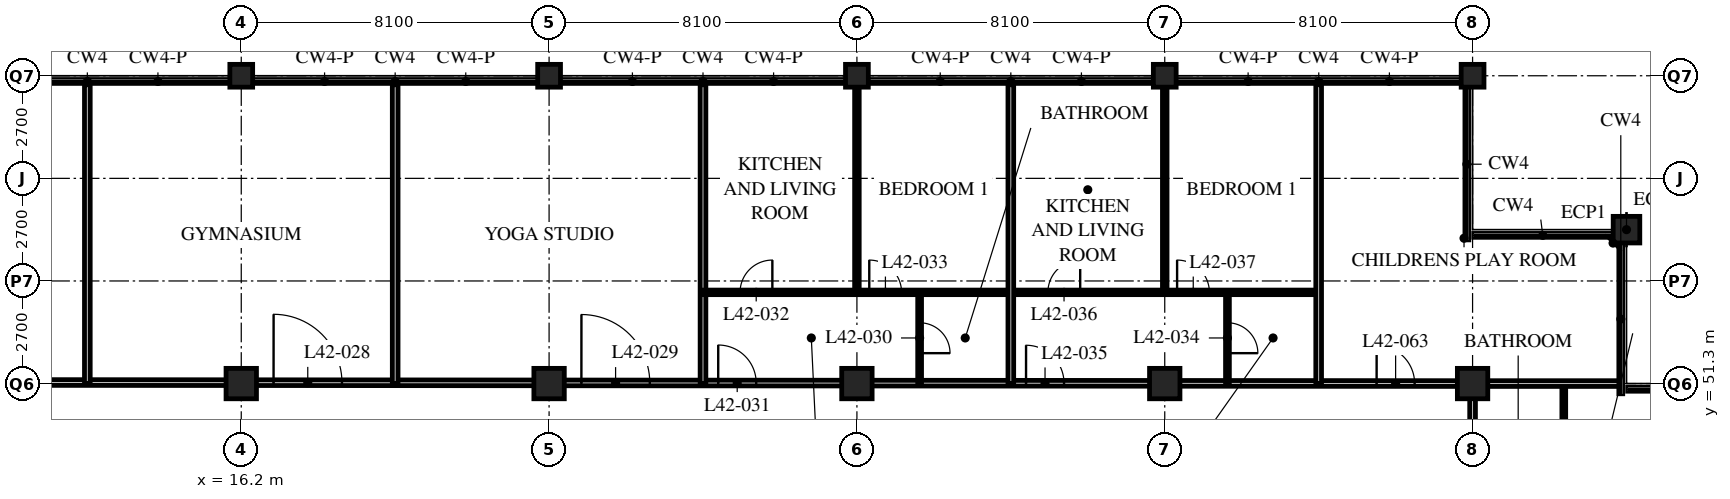
"""IFC4 building model, lengths in metres.
Left out: names, types, materials, properties, quantities, classifications, styles, units other than length and angle.
Written with IfcOpenShell. Run it as: python <this file> out.ifc"""

import sys

from ifc_helpers import new_model, si_unit, direction, frame, frame_2d, origin, origin_2d, place, context, subcontext, project, spatial, rectangle, hollow_rectangle, extrude, element, fill, save


model = new_model("IFC4")
c1 = context("Model", 3, precision=1e-05, world=origin(), true_north=direction((0.0, 1.0)))
c2 = subcontext(c1, "Body", "Model", "MODEL_VIEW")
j1 = project(units=[si_unit("LENGTHUNIT", "METRE"), si_unit("PLANEANGLEUNIT", "RADIAN")], contexts=[c1])
p1 = place(None, origin())
s1 = spatial("IfcSite", under=j1, at=p1, CompositionType="ELEMENT")
p2 = place(p1, origin())
s2 = spatial("IfcBuilding", under=s1, at=p2, CompositionType="ELEMENT")
p3 = place(p2, frame((0.0, 0.0, 165.0)))
s3 = spatial("IfcBuildingStorey", under=s2, at=p3, CompositionType="ELEMENT", Elevation=165.0)
p4 = place(p3, frame((16.2, 51.3, 0.0), z_axis=(0.0, 0.0, 1.0), x_axis=(1.0, 0.0, 0.0)))
e1 = element("IfcColumn", 1, at=p4, inside=s3, PredefinedType="COLUMN", context=c2, shape_type="SweptSolid", body=[
    extrude(hollow_rectangle(XDim=0.8, YDim=0.8, WallThickness=0.08, at=origin_2d()), origin(), (0.0, 0.0, 1.0), 5.4),
])
p5 = place(p3, frame((16.2, 59.4, 0.0), z_axis=(0.0, 0.0, 1.0), x_axis=(1.0, 0.0, 0.0)))
e2 = element("IfcColumn", 2, at=p5, inside=s3, PredefinedType="COLUMN", context=c2, shape_type="SweptSolid", body=[
    extrude(hollow_rectangle(XDim=0.6, YDim=0.6, WallThickness=0.05, at=origin_2d()), origin(), (0.0, 0.0, 1.0), 5.4),
])
p6 = place(p3, frame((24.3, 51.3, 0.0), z_axis=(0.0, 0.0, 1.0), x_axis=(1.0, 0.0, 0.0)))
e3 = element("IfcColumn", 3, at=p6, inside=s3, PredefinedType="COLUMN", context=c2, shape_type="SweptSolid", body=[
    extrude(hollow_rectangle(XDim=0.8, YDim=0.8, WallThickness=0.08, at=origin_2d()), origin(), (0.0, 0.0, 1.0), 5.4),
])
p7 = place(p3, frame((24.3, 59.4, 0.0), z_axis=(0.0, 0.0, 1.0), x_axis=(1.0, 0.0, 0.0)))
e4 = element("IfcColumn", 4, at=p7, inside=s3, PredefinedType="COLUMN", context=c2, shape_type="SweptSolid", body=[
    extrude(hollow_rectangle(XDim=0.6, YDim=0.6, WallThickness=0.05, at=origin_2d()), origin(), (0.0, 0.0, 1.0), 5.4),
])
p8 = place(p3, frame((32.4, 51.3, 0.0), z_axis=(0.0, 0.0, 1.0), x_axis=(1.0, 0.0, 0.0)))
e5 = element("IfcColumn", 5, at=p8, inside=s3, PredefinedType="COLUMN", context=c2, shape_type="SweptSolid", body=[
    extrude(hollow_rectangle(XDim=0.8, YDim=0.8, WallThickness=0.08, at=origin_2d()), origin(), (0.0, 0.0, 1.0), 5.4),
])
p9 = place(p3, frame((32.4, 59.4, 0.0), z_axis=(0.0, 0.0, 1.0), x_axis=(1.0, 0.0, 0.0)))
e6 = element("IfcColumn", 6, at=p9, inside=s3, PredefinedType="COLUMN", context=c2, shape_type="SweptSolid", body=[
    extrude(hollow_rectangle(XDim=0.6, YDim=0.6, WallThickness=0.05, at=origin_2d()), origin(), (0.0, 0.0, 1.0), 5.4),
])
p10 = place(p3, frame((40.5, 51.3, 0.0), z_axis=(0.0, 0.0, 1.0), x_axis=(1.0, 0.0, 0.0)))
e7 = element("IfcColumn", 7, at=p10, inside=s3, PredefinedType="COLUMN", context=c2, shape_type="SweptSolid", body=[
    extrude(hollow_rectangle(XDim=0.8, YDim=0.8, WallThickness=0.08, at=origin_2d()), origin(), (0.0, 0.0, 1.0), 5.4),
])
p11 = place(p3, frame((40.5, 59.4, 0.0), z_axis=(0.0, 0.0, 1.0), x_axis=(1.0, 0.0, 0.0)))
e8 = element("IfcColumn", 8, at=p11, inside=s3, PredefinedType="COLUMN", context=c2, shape_type="SweptSolid", body=[
    extrude(hollow_rectangle(XDim=0.6, YDim=0.6, WallThickness=0.05, at=origin_2d()), origin(), (0.0, 0.0, 1.0), 5.4),
])
p12 = place(p3, frame((48.6, 51.3, 0.0), z_axis=(0.0, 0.0, 1.0), x_axis=(1.0, 0.0, 0.0)))
e9 = element("IfcColumn", 9, at=p12, inside=s3, PredefinedType="COLUMN", context=c2, shape_type="SweptSolid", body=[
    extrude(hollow_rectangle(XDim=0.8, YDim=0.8, WallThickness=0.08, at=origin_2d()), origin(), (0.0, 0.0, 1.0), 5.4),
])
p13 = place(p3, frame((48.6, 59.4, 0.0), z_axis=(0.0, 0.0, 1.0), x_axis=(1.0, 0.0, 0.0)))
e10 = element("IfcColumn", 10, at=p13, inside=s3, PredefinedType="COLUMN", context=c2, shape_type="SweptSolid", body=[
    extrude(hollow_rectangle(XDim=0.6, YDim=0.6, WallThickness=0.05, at=origin_2d()), origin(), (0.0, 0.0, 1.0), 5.4),
])
p14 = place(p3, frame((52.65, 55.35, 0.0), z_axis=(0.0, 0.0, 1.0), x_axis=(1.0, 0.0, 0.0)))
e11 = element("IfcColumn", 11, at=p14, inside=s3, PredefinedType="COLUMN", context=c2, shape_type="SweptSolid", body=[
    extrude(hollow_rectangle(XDim=0.7, YDim=0.7, WallThickness=0.07, at=origin_2d()), origin(), (0.0, 0.0, 1.0), 5.4),
])
p15 = place(p3, frame((8.1, 51.33, 0.0), z_axis=(0.0, 0.0, 1.0), x_axis=(0.999999725116, -0.000741463917, 0.0)))
e12 = element("IfcWall", 12, at=p15, inside=s3, PredefinedType="PARTITIONING", context=c2, shape_type="SweptSolid", body=[
    extrude(rectangle(XDim=40.5, YDim=0.15, at=frame_2d((20.25, 0.0))), origin(), (0.0, 0.0, 1.0), 4.42),
])
p16 = place(p15, frame((8.95, 0.0, 0.0)))
e13 = element("IfcOpeningElement", 13, at=p16, cuts=e12, PredefinedType="OPENING", context=c2, shape_type="SweptSolid", body=[
    extrude(rectangle(XDim=1.8, YDim=2.4, at=frame_2d((0.9, 1.2))), frame((0.0, 0.085, 0.0), z_axis=(0.0, -1.0, 0.0), x_axis=(1.0, 0.0, 0.0)), (0.0, 0.0, 1.0), 0.17),
])
p17 = place(p15, frame((17.05, 0.0, 0.0)))
e14 = element("IfcOpeningElement", 14, at=p17, cuts=e12, PredefinedType="OPENING", context=c2, shape_type="SweptSolid", body=[
    extrude(rectangle(XDim=1.8, YDim=2.4, at=frame_2d((0.9, 1.2))), frame((0.0, 0.085, 0.0), z_axis=(0.0, -1.0, 0.0), x_axis=(1.0, 0.0, 0.0)), (0.0, 0.0, 1.0), 0.17),
])
p18 = place(p15, frame((20.65, 0.0, 0.0)))
e15 = element("IfcOpeningElement", 15, at=p18, cuts=e12, PredefinedType="OPENING", context=c2, shape_type="SweptSolid", body=[
    extrude(rectangle(XDim=1.0, YDim=2.1, at=frame_2d((0.5, 1.05))), frame((0.0, 0.085, 0.0), z_axis=(0.0, -1.0, 0.0), x_axis=(1.0, 0.0, 0.0)), (0.0, 0.0, 1.0), 0.17),
])
p19 = place(p15, frame((28.75, 0.0, 0.0)))
e16 = element("IfcOpeningElement", 16, at=p19, cuts=e12, PredefinedType="OPENING", context=c2, shape_type="SweptSolid", body=[
    extrude(rectangle(XDim=1.0, YDim=2.1, at=frame_2d((0.5, 1.05))), frame((0.0, 0.085, 0.0), z_axis=(0.0, -1.0, 0.0), x_axis=(1.0, 0.0, 0.0)), (0.0, 0.0, 1.0), 0.17),
])
p20 = place(p15, frame((37.975, 0.0, 0.0)))
e17 = element("IfcOpeningElement", 17, at=p20, cuts=e12, PredefinedType="OPENING", context=c2, shape_type="SweptSolid", body=[
    extrude(rectangle(XDim=1.0, YDim=2.1, at=frame_2d((0.5, 1.05))), frame((0.0, 0.085, 0.0), z_axis=(0.0, -1.0, 0.0), x_axis=(1.0, 0.0, 0.0)), (0.0, 0.0, 1.0), 0.17),
])
p21 = place(p15, frame((1.525, 0.0, 0.0)))
e18 = element("IfcOpeningElement", 18, at=p21, cuts=e12, PredefinedType="OPENING", context=c2, shape_type="SweptSolid", body=[
    extrude(rectangle(XDim=1.0, YDim=2.1, at=frame_2d((0.5, 1.05))), frame((0.0, 0.085, 0.0), z_axis=(0.0, -1.0, 0.0), x_axis=(1.0, 0.0, 0.0)), (0.0, 0.0, 1.0), 0.17),
])
p22 = place(p3, frame((48.6, 18.87, 0.0), z_axis=(0.0, 0.0, 1.0), x_axis=(0.0, 1.0, 0.0)))
e19 = element("IfcWall", 19, at=p22, inside=s3, PredefinedType="PARTITIONING", context=c2, shape_type="SweptSolid", body=[
    extrude(rectangle(XDim=32.43, YDim=0.15, at=frame_2d((16.215, 0.0))), origin(), (0.0, 0.0, 1.0), 4.42),
])
p23 = place(p22, frame((0.9, 0.0, 0.0)))
e20 = element("IfcOpeningElement", 20, at=p23, cuts=e19, PredefinedType="OPENING", context=c2, shape_type="SweptSolid", body=[
    extrude(rectangle(XDim=1.0, YDim=2.1, at=frame_2d((0.5, 1.05))), frame((0.0, 0.085, 0.0), z_axis=(0.0, -1.0, 0.0), x_axis=(1.0, 0.0, 0.0)), (0.0, 0.0, 1.0), 0.17),
])
p24 = place(p22, frame((17.05, 0.0, 0.0)))
e21 = element("IfcOpeningElement", 21, at=p24, cuts=e19, PredefinedType="OPENING", context=c2, shape_type="SweptSolid", body=[
    extrude(rectangle(XDim=1.8, YDim=2.4, at=frame_2d((0.9, 1.2))), frame((0.0, 0.085, 0.0), z_axis=(0.0, -1.0, 0.0), x_axis=(1.0, 0.0, 0.0)), (0.0, 0.0, 1.0), 0.17),
])
p25 = place(p22, frame((20.65, 0.0, 0.0)))
e22 = element("IfcOpeningElement", 22, at=p25, cuts=e19, PredefinedType="OPENING", context=c2, shape_type="SweptSolid", body=[
    extrude(rectangle(XDim=1.0, YDim=2.1, at=frame_2d((0.5, 1.05))), frame((0.0, 0.085, 0.0), z_axis=(0.0, -1.0, 0.0), x_axis=(1.0, 0.0, 0.0)), (0.0, 0.0, 1.0), 0.17),
])
p26 = place(p22, frame((29.05, 0.0, 0.0)))
e23 = element("IfcOpeningElement", 23, at=p26, cuts=e19, PredefinedType="OPENING", context=c2, shape_type="SweptSolid", body=[
    extrude(rectangle(XDim=1.0, YDim=2.1, at=frame_2d((0.5, 1.05))), frame((0.0, 0.085, 0.0), z_axis=(0.0, -1.0, 0.0), x_axis=(1.0, 0.0, 0.0)), (0.0, 0.0, 1.0), 0.17),
])
for number, where, z_axis, x_axis in (
    (24, (20.25, 51.3, 0.0), (0.0, 0.0, 1.0), (0.0, 1.0, 0.0)),
    (25, (28.35, 51.3, 0.0), (0.0, 0.0, 1.0), (0.0, 1.0, 0.0)),
):
    element("IfcWall", number, at=place(p3, frame(where, z_axis=z_axis, x_axis=x_axis)), inside=s3, PredefinedType="PARTITIONING", context=c2, shape_type="SweptSolid", body=[
        extrude(rectangle(XDim=7.865, YDim=0.15, at=frame_2d((3.932, 0.0))), origin(), (0.0, 0.0, 1.0), 5.19),
    ])
p27 = place(p3, frame((28.35, 53.7, 0.0), z_axis=(0.0, 0.0, 1.0), x_axis=(1.0, 0.0, 0.0)))
e26 = element("IfcWall", 26, at=p27, inside=s3, PredefinedType="PARTITIONING", context=c2, shape_type="SweptSolid", body=[
    extrude(rectangle(XDim=16.2, YDim=0.12, at=frame_2d((8.1, 0.0))), origin(), (0.0, 0.0, 1.0), 5.19),
])
p28 = place(p27, frame((0.975, 0.0, 0.0)))
e27 = element("IfcOpeningElement", 27, at=p28, cuts=e26, PredefinedType="OPENING", context=c2, shape_type="SweptSolid", body=[
    extrude(rectangle(XDim=0.85, YDim=2.1, at=frame_2d((0.425, 1.05))), frame((0.0, 0.07, 0.0), z_axis=(0.0, -1.0, 0.0), x_axis=(1.0, 0.0, 0.0)), (0.0, 0.0, 1.0), 0.14),
])
p29 = place(p27, frame((4.375, 0.0, 0.0)))
e28 = element("IfcOpeningElement", 28, at=p29, cuts=e26, PredefinedType="OPENING", context=c2, shape_type="SweptSolid", body=[
    extrude(rectangle(XDim=0.85, YDim=2.1, at=frame_2d((0.425, 1.05))), frame((0.0, 0.07, 0.0), z_axis=(0.0, -1.0, 0.0), x_axis=(1.0, 0.0, 0.0)), (0.0, 0.0, 1.0), 0.14),
])
p30 = place(p27, frame((9.075, 0.0, 0.0)))
e29 = element("IfcOpeningElement", 29, at=p30, cuts=e26, PredefinedType="OPENING", context=c2, shape_type="SweptSolid", body=[
    extrude(rectangle(XDim=0.85, YDim=2.1, at=frame_2d((0.425, 1.05))), frame((0.0, 0.07, 0.0), z_axis=(0.0, -1.0, 0.0), x_axis=(1.0, 0.0, 0.0)), (0.0, 0.0, 1.0), 0.14),
])
p31 = place(p27, frame((12.475, 0.0, 0.0)))
e30 = element("IfcOpeningElement", 30, at=p31, cuts=e26, PredefinedType="OPENING", context=c2, shape_type="SweptSolid", body=[
    extrude(rectangle(XDim=0.85, YDim=2.1, at=frame_2d((0.425, 1.05))), frame((0.0, 0.07, 0.0), z_axis=(0.0, -1.0, 0.0), x_axis=(1.0, 0.0, 0.0)), (0.0, 0.0, 1.0), 0.14),
])
p32 = place(p3, frame((34.05, 51.3, 0.0), z_axis=(0.0, 0.0, 1.0), x_axis=(0.0, 1.0, 0.0)))
e31 = element("IfcWall", 31, at=p32, inside=s3, PredefinedType="PARTITIONING", context=c2, shape_type="SweptSolid", body=[
    extrude(rectangle(XDim=2.4, YDim=0.1, at=frame_2d((1.2, 0.0))), origin(), (0.0, 0.0, 1.0), 5.19),
])
p33 = place(p32, frame((0.8, 0.0, 0.0)))
e32 = element("IfcOpeningElement", 32, at=p33, cuts=e31, PredefinedType="OPENING", context=c2, shape_type="SweptSolid", body=[
    extrude(rectangle(XDim=0.8, YDim=2.1, at=frame_2d((0.4, 1.05))), frame((0.0, 0.06, 0.0), z_axis=(0.0, -1.0, 0.0), x_axis=(1.0, 0.0, 0.0)), (0.0, 0.0, 1.0), 0.12),
])
p34 = place(p3, frame((32.4, 53.7, 0.0), z_axis=(0.0, 0.0, 1.0), x_axis=(0.0, 1.0, 0.0)))
e33 = element("IfcWall", 33, at=p34, inside=s3, PredefinedType="PARTITIONING", context=c2, shape_type="SweptSolid", body=[
    extrude(rectangle(XDim=5.4, YDim=0.12, at=frame_2d((2.7, 0.0))), origin(), (0.0, 0.0, 1.0), 4.42),
])
p35 = place(p3, frame((36.45, 51.3, 0.0), z_axis=(0.0, 0.0, 1.0), x_axis=(0.0, 1.0, 0.0)))
e34 = element("IfcWall", 34, at=p35, inside=s3, PredefinedType="PARTITIONING", context=c2, shape_type="SweptSolid", body=[
    extrude(rectangle(XDim=7.865, YDim=0.15, at=frame_2d((3.932, 0.0))), origin(), (0.0, 0.0, 1.0), 5.19),
])
p36 = place(p3, frame((42.15, 51.3, 0.0), z_axis=(0.0, 0.0, 1.0), x_axis=(0.0, 1.0, 0.0)))
e35 = element("IfcWall", 35, at=p36, inside=s3, PredefinedType="PARTITIONING", context=c2, shape_type="SweptSolid", body=[
    extrude(rectangle(XDim=2.4, YDim=0.1, at=frame_2d((1.2, 0.0))), origin(), (0.0, 0.0, 1.0), 5.19),
])
p37 = place(p36, frame((0.8, 0.0, 0.0)))
e36 = element("IfcOpeningElement", 36, at=p37, cuts=e35, PredefinedType="OPENING", context=c2, shape_type="SweptSolid", body=[
    extrude(rectangle(XDim=0.8, YDim=2.1, at=frame_2d((0.4, 1.05))), frame((0.0, 0.06, 0.0), z_axis=(0.0, -1.0, 0.0), x_axis=(1.0, 0.0, 0.0)), (0.0, 0.0, 1.0), 0.12),
])
p38 = place(p3, frame((40.5, 53.7, 0.0), z_axis=(0.0, 0.0, 1.0), x_axis=(0.0, 1.0, 0.0)))
e37 = element("IfcWall", 37, at=p38, inside=s3, PredefinedType="PARTITIONING", context=c2, shape_type="SweptSolid", body=[
    extrude(rectangle(XDim=5.4, YDim=0.12, at=frame_2d((2.7, 0.0))), origin(), (0.0, 0.0, 1.0), 4.42),
])
p39 = place(p3, frame((51.0, 49.1, 0.0), z_axis=(0.0, 0.0, 1.0), x_axis=(0.0, 1.0, 0.0)))
e38 = element("IfcWall", 38, at=p39, inside=s3, PredefinedType="PARTITIONING", context=c2, shape_type="SweptSolid", body=[
    extrude(rectangle(XDim=2.2, YDim=0.1, at=frame_2d((1.1, 0.0))), origin(), (0.0, 0.0, 1.0), 5.19),
])
p40 = place(p3, frame((48.6, 51.3, 0.0), z_axis=(0.0, 0.0, 1.0), x_axis=(1.0, 0.0, 0.0)))
e39 = element("IfcWall", 39, at=p40, inside=s3, PredefinedType="PARTITIONING", context=c2, shape_type="SweptSolid", body=[
    extrude(rectangle(XDim=3.883, YDim=0.15, at=frame_2d((1.941, 0.0))), origin(), (0.0, 0.0, 1.0), 4.42),
])
for number, where, z_axis, x_axis in (
    (40, (44.55, 51.3, 0.0), (0.0, 0.0, 1.0), (0.0, 1.0, 0.0)),
    (41, (12.15, 51.3, 0.0), (0.0, 0.0, 1.0), (0.0, 1.0, 0.0)),
):
    element("IfcWall", number, at=place(p3, frame(where, z_axis=z_axis, x_axis=x_axis)), inside=s3, PredefinedType="PARTITIONING", context=c2, shape_type="SweptSolid", body=[
        extrude(rectangle(XDim=7.865, YDim=0.15, at=frame_2d((3.932, 0.0))), origin(), (0.0, 0.0, 1.0), 5.19),
    ])
p41 = place(p16, origin())
e42 = element("IfcDoor", 42, at=p41, inside=s3, OperationType="DOUBLE_DOOR_SINGLE_SWING", PredefinedType="DOOR", context=c2, shape_type="SweptSolid", body=[
    extrude(rectangle(XDim=1.8, YDim=2.4, at=frame_2d((0.9, 1.2))), frame((0.0, 0.025, 0.0), z_axis=(0.0, -1.0, 0.0), x_axis=(1.0, 0.0, 0.0)), (0.0, 0.0, 1.0), 0.05),
])
fill(e13, e42)
p42 = place(p17, origin())
e43 = element("IfcDoor", 43, at=p42, inside=s3, OperationType="DOUBLE_DOOR_SINGLE_SWING", PredefinedType="DOOR", context=c2, shape_type="SweptSolid", body=[
    extrude(rectangle(XDim=1.8, YDim=2.4, at=frame_2d((0.9, 1.2))), frame((0.0, 0.025, 0.0), z_axis=(0.0, -1.0, 0.0), x_axis=(1.0, 0.0, 0.0)), (0.0, 0.0, 1.0), 0.05),
])
fill(e14, e43)
p43 = place(p33, origin())
e44 = element("IfcDoor", 44, at=p43, inside=s3, OperationType="SINGLE_SWING_RIGHT", PredefinedType="DOOR", context=c2, shape_type="SweptSolid", body=[
    extrude(rectangle(XDim=0.8, YDim=2.1, at=frame_2d((0.4, 1.05))), frame((0.0, 0.025, 0.0), z_axis=(0.0, -1.0, 0.0), x_axis=(1.0, 0.0, 0.0)), (0.0, 0.0, 1.0), 0.05),
])
fill(e32, e44)
p44 = place(p18, origin())
e45 = element("IfcDoor", 45, at=p44, inside=s3, OperationType="SINGLE_SWING_LEFT", PredefinedType="DOOR", context=c2, shape_type="SweptSolid", body=[
    extrude(rectangle(XDim=1.0, YDim=2.1, at=frame_2d((0.5, 1.05))), frame((0.0, 0.025, 0.0), z_axis=(0.0, -1.0, 0.0), x_axis=(1.0, 0.0, 0.0)), (0.0, 0.0, 1.0), 0.05),
])
fill(e15, e45)
p45 = place(p28, origin())
e46 = element("IfcDoor", 46, at=p45, inside=s3, OperationType="SINGLE_SWING_RIGHT", PredefinedType="DOOR", context=c2, shape_type="SweptSolid", body=[
    extrude(rectangle(XDim=0.85, YDim=2.1, at=frame_2d((0.425, 1.05))), frame((0.0, 0.025, 0.0), z_axis=(0.0, -1.0, 0.0), x_axis=(1.0, 0.0, 0.0)), (0.0, 0.0, 1.0), 0.05),
])
fill(e27, e46)
p46 = place(p29, origin())
e47 = element("IfcDoor", 47, at=p46, inside=s3, OperationType="SINGLE_SWING_LEFT", PredefinedType="DOOR", context=c2, shape_type="SweptSolid", body=[
    extrude(rectangle(XDim=0.85, YDim=2.1, at=frame_2d((0.425, 1.05))), frame((0.0, 0.025, 0.0), z_axis=(0.0, -1.0, 0.0), x_axis=(1.0, 0.0, 0.0)), (0.0, 0.0, 1.0), 0.05),
])
fill(e28, e47)
p47 = place(p37, origin())
e48 = element("IfcDoor", 48, at=p47, inside=s3, OperationType="SINGLE_SWING_RIGHT", PredefinedType="DOOR", context=c2, shape_type="SweptSolid", body=[
    extrude(rectangle(XDim=0.8, YDim=2.1, at=frame_2d((0.4, 1.05))), frame((0.0, 0.025, 0.0), z_axis=(0.0, -1.0, 0.0), x_axis=(1.0, 0.0, 0.0)), (0.0, 0.0, 1.0), 0.05),
])
fill(e36, e48)
p48 = place(p19, origin())
e49 = element("IfcDoor", 49, at=p48, inside=s3, OperationType="SINGLE_SWING_LEFT", PredefinedType="DOOR", context=c2, shape_type="SweptSolid", body=[
    extrude(rectangle(XDim=1.0, YDim=2.1, at=frame_2d((0.5, 1.05))), frame((0.0, 0.025, 0.0), z_axis=(0.0, -1.0, 0.0), x_axis=(1.0, 0.0, 0.0)), (0.0, 0.0, 1.0), 0.05),
])
fill(e16, e49)
p49 = place(p30, origin())
e50 = element("IfcDoor", 50, at=p49, inside=s3, OperationType="SINGLE_SWING_RIGHT", PredefinedType="DOOR", context=c2, shape_type="SweptSolid", body=[
    extrude(rectangle(XDim=0.85, YDim=2.1, at=frame_2d((0.425, 1.05))), frame((0.0, 0.025, 0.0), z_axis=(0.0, -1.0, 0.0), x_axis=(1.0, 0.0, 0.0)), (0.0, 0.0, 1.0), 0.05),
])
fill(e29, e50)
p50 = place(p31, origin())
e51 = element("IfcDoor", 51, at=p50, inside=s3, OperationType="SINGLE_SWING_LEFT", PredefinedType="DOOR", context=c2, shape_type="SweptSolid", body=[
    extrude(rectangle(XDim=0.85, YDim=2.1, at=frame_2d((0.425, 1.05))), frame((0.0, 0.025, 0.0), z_axis=(0.0, -1.0, 0.0), x_axis=(1.0, 0.0, 0.0)), (0.0, 0.0, 1.0), 0.05),
])
fill(e30, e51)
p51 = place(p20, origin())
e52 = element("IfcDoor", 52, at=p51, inside=s3, OperationType="SINGLE_SWING_LEFT", PredefinedType="DOOR", context=c2, shape_type="SweptSolid", body=[
    extrude(rectangle(XDim=1.0, YDim=2.1, at=frame_2d((0.5, 1.05))), frame((0.0, 0.025, 0.0), z_axis=(0.0, -1.0, 0.0), x_axis=(1.0, 0.0, 0.0)), (0.0, 0.0, 1.0), 0.05),
])
fill(e17, e52)
save(model, sys.argv[1])
